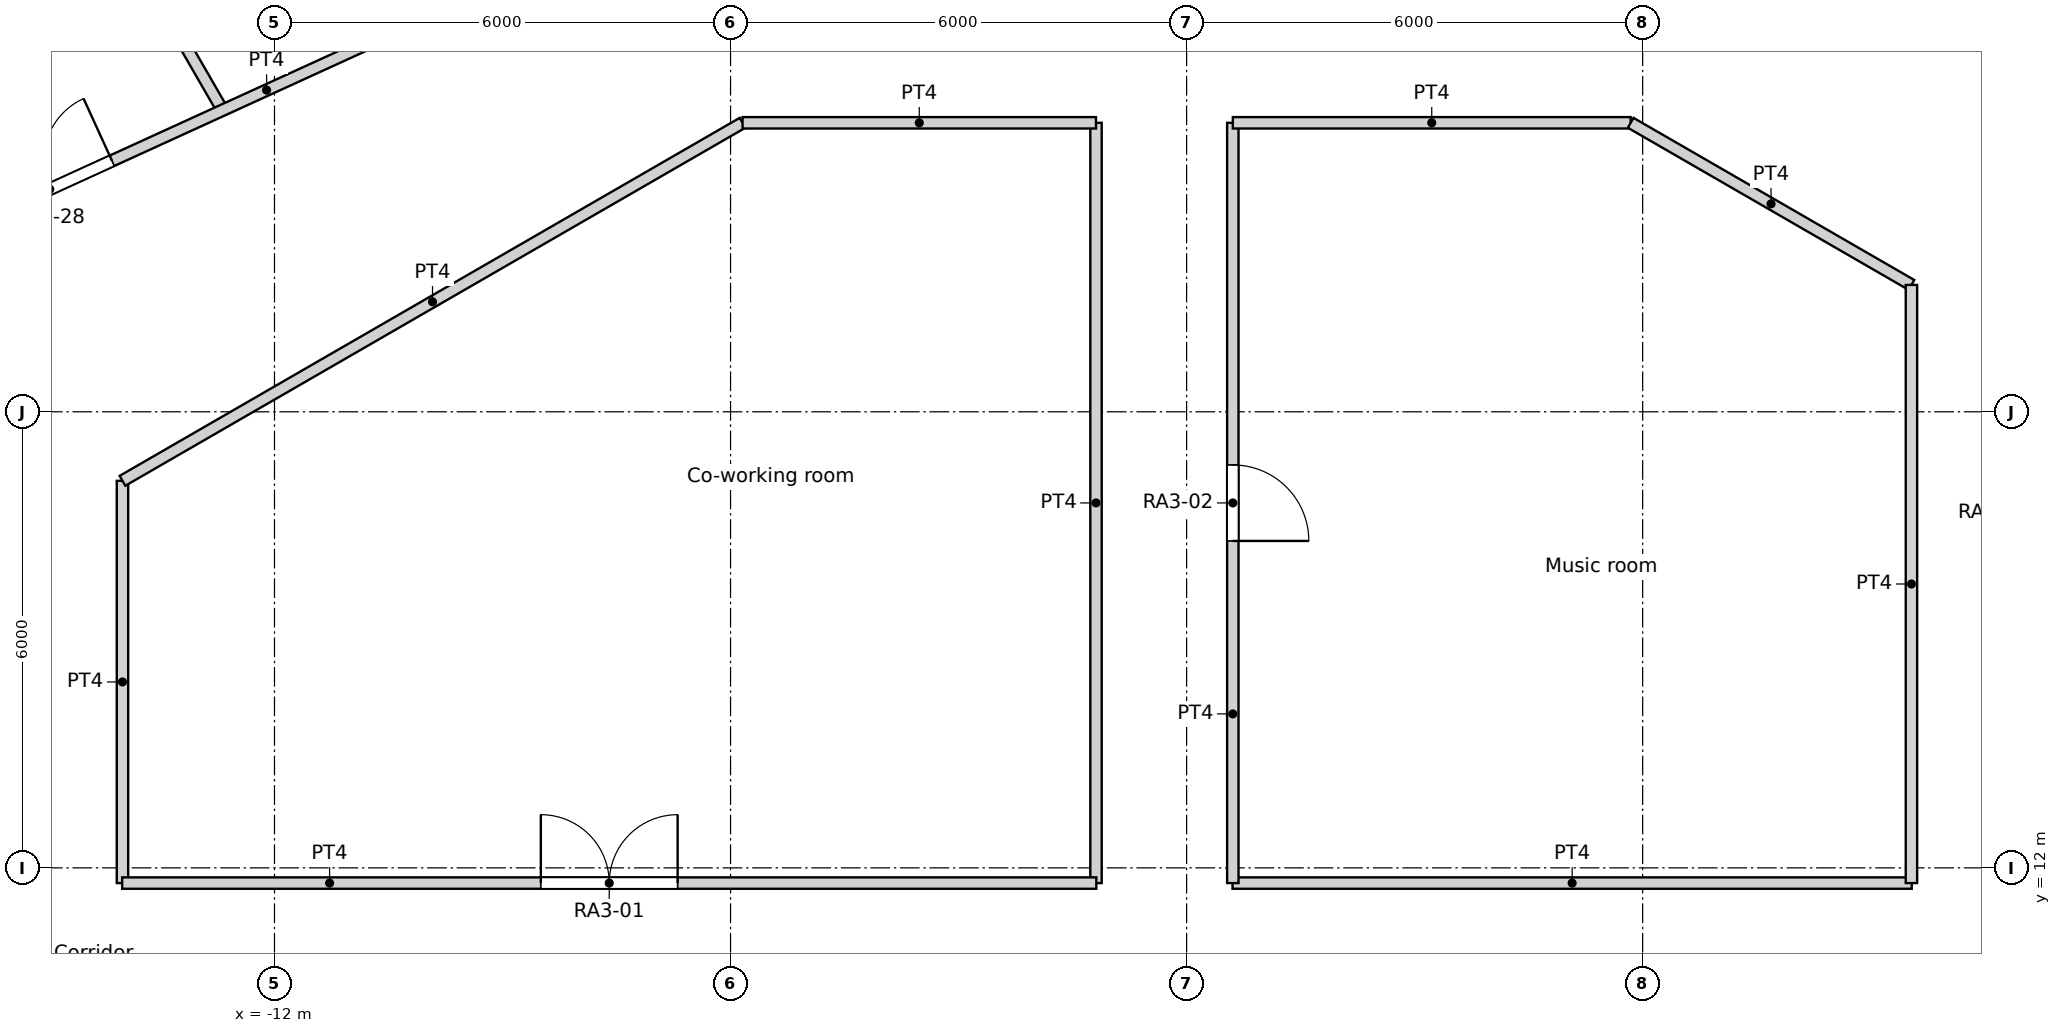
"""IFC4 building model, lengths in metres.
Left out: names, types, materials, properties, quantities, classifications, styles, units other than length and angle.
Written with IfcOpenShell. Run it as: python <this file> out.ifc"""

import sys

from ifc_helpers import new_model, si_unit, direction, frame, frame_2d, origin, origin_2d, place, context, subcontext, project, spatial, rectangle, circle, extrude, element, fill, save


model = new_model("IFC4")
c1 = context("Model", 3, precision=1e-05, world=origin(), true_north=direction((0.0, 1.0)))
c2 = subcontext(c1, "Body", "Model", "MODEL_VIEW")
j1 = project(units=[si_unit("LENGTHUNIT", "METRE"), si_unit("PLANEANGLEUNIT", "RADIAN")], contexts=[c1])
p1 = place(None, origin())
s1 = spatial("IfcSite", under=j1, at=p1, CompositionType="ELEMENT")
p2 = place(p1, origin())
s2 = spatial("IfcBuilding", under=s1, at=p2, CompositionType="ELEMENT")
p3 = place(p2, frame((0.0, 0.0, 49.8)))
s3 = spatial("IfcBuildingStorey", under=s2, at=p3, CompositionType="ELEMENT", Elevation=49.8)
for number, where, z_axis, x_axis in (
    (1, (9.723, 22.54, 0.0), (0.0, 0.0, 1.0), (1.0, 0.0, 0.0)),
    (2, (-12.274, 21.259, 0.0), (0.0, 0.0, 1.0), (1.0, 0.0, 0.0)),
):
    element("IfcColumn", number, at=place(p3, frame(where, z_axis=z_axis, x_axis=x_axis)), inside=s3, PredefinedType="COLUMN", context=c2, shape_type="SweptSolid", body=[
        extrude(circle(Radius=0.75, at=origin_2d()), origin(), (0.0, 0.0, 1.0), 3.6),
    ])
for number, where, z_axis, x_axis in (
    (3, (6.876, 17.521, 0.0), (0.0, 0.0, 1.0), (1.0, 0.0, 0.0)),
    (4, (1.406, 18.77, 0.0), (0.0, 0.0, 1.0), (1.0, 0.0, 0.0)),
    (5, (-4.188, 18.35, 0.0), (0.0, 0.0, 1.0), (1.0, 0.0, 0.0)),
    (6, (-9.411, 16.301, 0.0), (0.0, 0.0, 1.0), (1.0, 0.0, 0.0)),
    (7, (-13.798, 12.802, 0.0), (0.0, 0.0, 1.0), (1.0, 0.0, 0.0)),
):
    element("IfcColumn", number, at=place(p3, frame(where, z_axis=z_axis, x_axis=x_axis)), inside=s3, PredefinedType="COLUMN", context=c2, shape_type="SweptSolid", body=[
        extrude(circle(Radius=0.8, at=origin_2d()), origin(), (0.0, 0.0, 1.0), 3.6),
    ])
p4 = place(p3, frame((-14.004, 11.8, 0.0), z_axis=(0.0, 0.0, 1.0), x_axis=(1.0, 0.0, 0.0)))
e8 = element("IfcWall", 8, at=p4, inside=s3, PredefinedType="PARTITIONING", context=c2, shape_type="SweptSolid", body=[
    extrude(rectangle(XDim=12.816, YDim=0.15, at=frame_2d((6.408, 0.0))), origin(), (0.0, 0.0, 1.0), 3.15),
])
p5 = place(p4, frame((5.508, 0.0, 0.0)))
e9 = element("IfcOpeningElement", 9, at=p5, cuts=e8, PredefinedType="OPENING", context=c2, shape_type="SweptSolid", body=[
    extrude(rectangle(XDim=1.8, YDim=2.1, at=frame_2d((0.9, 1.05))), frame((0.0, 0.075, 0.0), z_axis=(0.0, -1.0, 0.0), x_axis=(1.0, 0.0, 0.0)), (0.0, 0.0, 1.0), 0.15),
])
p6 = place(p3, frame((0.604, 11.8, 0.0), z_axis=(0.0, 0.0, 1.0), x_axis=(1.0, 0.0, 0.0)))
e10 = element("IfcWall", 10, at=p6, inside=s3, PredefinedType="PARTITIONING", context=c2, shape_type="SweptSolid", body=[
    extrude(rectangle(XDim=8.936, YDim=0.15, at=frame_2d((4.468, 0.0))), origin(), (0.0, 0.0, 1.0), 3.15),
])
p7 = place(p3, frame((-1.192, 11.8, 0.0), z_axis=(0.0, 0.0, 1.0), x_axis=(0.0, 1.0, 0.0)))
e11 = element("IfcWall", 11, at=p7, inside=s3, PredefinedType="PARTITIONING", context=c2, shape_type="SweptSolid", body=[
    extrude(rectangle(XDim=10.002, YDim=0.15, at=frame_2d((5.001, 0.0))), origin(), (0.0, 0.0, 1.0), 3.15),
])
p8 = place(p3, frame((-5.842, 21.802, 0.0), z_axis=(0.0, 0.0, 1.0), x_axis=(1.0, 0.0, 0.0)))
e12 = element("IfcWall", 12, at=p8, inside=s3, PredefinedType="PARTITIONING", context=c2, shape_type="SweptSolid", body=[
    extrude(rectangle(XDim=4.65, YDim=0.15, at=frame_2d((2.325, 0.0))), origin(), (0.0, 0.0, 1.0), 3.15),
])
p9 = place(p3, frame((-14.0, 17.092, 0.0), z_axis=(0.0, 0.0, 1.0), x_axis=(0.86602719091, 0.499996904595, 0.0)))
e13 = element("IfcWall", 13, at=p9, inside=s3, PredefinedType="PARTITIONING", context=c2, shape_type="SweptSolid", body=[
    extrude(rectangle(XDim=9.42, YDim=0.15, at=frame_2d((4.71, 0.0))), origin(), (0.0, 0.0, 1.0), 3.15),
])
p10 = place(p3, frame((-14.0, 11.8, 0.0), z_axis=(0.0, 0.0, 1.0), x_axis=(0.0, 1.0, 0.0)))
e14 = element("IfcWall", 14, at=p10, inside=s3, PredefinedType="PARTITIONING", context=c2, shape_type="SweptSolid", body=[
    extrude(rectangle(XDim=5.292, YDim=0.15, at=frame_2d((2.646, 0.0))), origin(), (0.0, 0.0, 1.0), 3.15),
])
p11 = place(p3, frame((9.536, 11.8, 0.0), z_axis=(0.0, 0.0, 1.0), x_axis=(0.0, 1.0, 0.0)))
e15 = element("IfcWall", 15, at=p11, inside=s3, PredefinedType="PARTITIONING", context=c2, shape_type="SweptSolid", body=[
    extrude(rectangle(XDim=7.869, YDim=0.15, at=frame_2d((3.935, 0.0))), origin(), (0.0, 0.0, 1.0), 3.15),
])
p12 = place(p3, frame((5.842, 21.802, 0.0), z_axis=(0.0, 0.0, 1.0), x_axis=(0.865983505205, -0.500072563448, 0.0)))
e16 = element("IfcWall", 16, at=p12, inside=s3, PredefinedType="PARTITIONING", context=c2, shape_type="SweptSolid", body=[
    extrude(rectangle(XDim=4.265, YDim=0.15, at=frame_2d((2.133, 0.0))), origin(), (0.0, 0.0, 1.0), 3.15),
])
p13 = place(p3, frame((0.608, 21.802, 0.0), z_axis=(0.0, 0.0, 1.0), x_axis=(1.0, 0.0, 0.0)))
e17 = element("IfcWall", 17, at=p13, inside=s3, PredefinedType="PARTITIONING", context=c2, shape_type="SweptSolid", body=[
    extrude(rectangle(XDim=5.234, YDim=0.15, at=frame_2d((2.617, 0.0))), origin(), (0.0, 0.0, 1.0), 3.15),
])
p14 = place(p3, frame((0.608, 11.8, 0.0), z_axis=(0.0, 0.0, 1.0), x_axis=(0.0, 1.0, 0.0)))
e18 = element("IfcWall", 18, at=p14, inside=s3, PredefinedType="PARTITIONING", context=c2, shape_type="SweptSolid", body=[
    extrude(rectangle(XDim=10.002, YDim=0.15, at=frame_2d((5.001, 0.0))), origin(), (0.0, 0.0, 1.0), 3.15),
])
p15 = place(p14, frame((4.501, 0.0, 0.0)))
e19 = element("IfcOpeningElement", 19, at=p15, cuts=e18, PredefinedType="OPENING", context=c2, shape_type="SweptSolid", body=[
    extrude(rectangle(XDim=1.0, YDim=2.04, at=frame_2d((0.5, 1.02))), frame((0.0, 0.075, 0.0), z_axis=(0.0, -1.0, 0.0), x_axis=(1.0, 0.0, 0.0)), (0.0, 0.0, 1.0), 0.15),
])
p16 = place(p3, frame((-17.234, 19.888, 0.0), z_axis=(0.0, 0.0, 1.0), x_axis=(0.90953867323, 0.415619299238, 0.0)))
e20 = element("IfcWall", 20, at=p16, inside=s3, PredefinedType="PARTITIONING", context=c2, shape_type="SweptSolid", body=[
    extrude(rectangle(XDim=14.829, YDim=0.15, at=frame_2d((7.415, 0.0))), origin(), (0.0, 0.0, 1.0), 3.15),
])
p17 = place(p16, frame((12.797, 0.0, 0.0)))
e21 = element("IfcOpeningElement", 21, at=p17, cuts=e20, PredefinedType="OPENING", context=c2, shape_type="SweptSolid", body=[
    extrude(rectangle(XDim=1.0, YDim=2.1, at=frame_2d((0.5, 1.05))), frame((0.0, 0.075, 0.0), z_axis=(0.0, -1.0, 0.0), x_axis=(1.0, 0.0, 0.0)), (0.0, 0.0, 1.0), 0.15),
])
p18 = place(p16, frame((7.877, 0.0, 0.0)))
e22 = element("IfcOpeningElement", 22, at=p18, cuts=e20, PredefinedType="OPENING", context=c2, shape_type="SweptSolid", body=[
    extrude(rectangle(XDim=1.0, YDim=2.1, at=frame_2d((0.5, 1.05))), frame((0.0, 0.075, 0.0), z_axis=(0.0, -1.0, 0.0), x_axis=(1.0, 0.0, 0.0)), (0.0, 0.0, 1.0), 0.15),
])
p19 = place(p16, frame((1.604, 0.0, 0.0)))
e23 = element("IfcOpeningElement", 23, at=p19, cuts=e20, PredefinedType="OPENING", context=c2, shape_type="SweptSolid", body=[
    extrude(rectangle(XDim=1.8, YDim=2.1, at=frame_2d((0.9, 1.05))), frame((0.0, 0.075, 0.0), z_axis=(0.0, -1.0, 0.0), x_axis=(1.0, 0.0, 0.0)), (0.0, 0.0, 1.0), 0.15),
])
p20 = place(p3, frame((-15.612, 27.041, 0.0), z_axis=(0.0, 0.0, 1.0), x_axis=(0.499905289531, -0.866080077994, 0.0)))
e24 = element("IfcWall", 24, at=p20, inside=s3, PredefinedType="PARTITIONING", context=c2, shape_type="SweptSolid", body=[
    extrude(rectangle(XDim=5.857, YDim=0.15, at=frame_2d((2.928, 0.0))), origin(), (0.0, 0.0, 1.0), 3.15),
])
p21 = place(p5, origin())
e25 = element("IfcDoor", 25, at=p21, inside=s3, OperationType="DOUBLE_DOOR_SINGLE_SWING", PredefinedType="DOOR", context=c2, shape_type="SweptSolid", body=[
    extrude(rectangle(XDim=1.8, YDim=2.1, at=frame_2d((0.9, 1.05))), frame((0.0, 0.025, 0.0), z_axis=(0.0, -1.0, 0.0), x_axis=(1.0, 0.0, 0.0)), (0.0, 0.0, 1.0), 0.05),
])
fill(e9, e25)
p22 = place(p15, origin())
e26 = element("IfcDoor", 26, at=p22, inside=s3, OperationType="SINGLE_SWING_RIGHT", PredefinedType="DOOR", context=c2, shape_type="SweptSolid", body=[
    extrude(rectangle(XDim=1.0, YDim=2.04, at=frame_2d((0.5, 1.02))), frame((0.0, 0.025, 0.0), z_axis=(0.0, -1.0, 0.0), x_axis=(1.0, 0.0, 0.0)), (0.0, 0.0, 1.0), 0.05),
])
fill(e19, e26)
p23 = place(p19, origin())
e27 = element("IfcDoor", 27, at=p23, inside=s3, OperationType="DOUBLE_DOOR_SINGLE_SWING", PredefinedType="DOOR", context=c2, shape_type="SweptSolid", body=[
    extrude(rectangle(XDim=1.8, YDim=2.1, at=frame_2d((0.9, 1.05))), frame((0.0, 0.025, 0.0), z_axis=(0.0, -1.0, 0.0), x_axis=(1.0, 0.0, 0.0)), (0.0, 0.0, 1.0), 0.05),
])
fill(e23, e27)
save(model, sys.argv[1])
